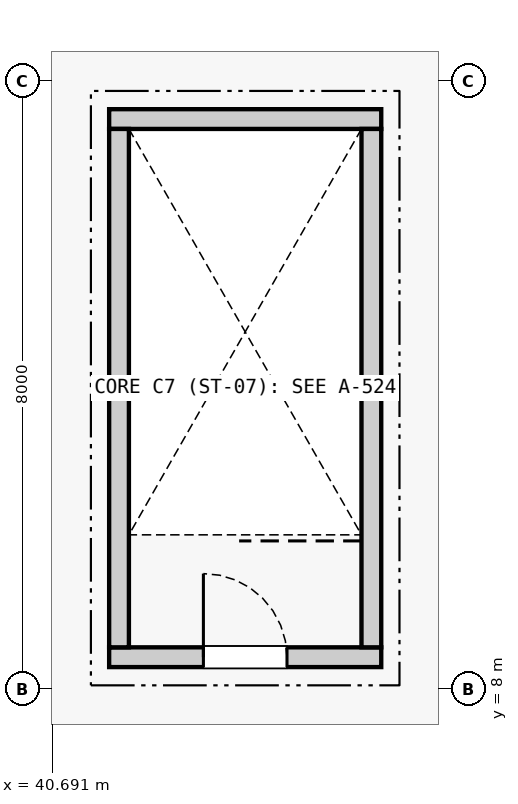
"""IFC4 building model, lengths in metres.
Left out: names, types, materials, properties, quantities, classifications, styles, units other than length and angle.
Written with IfcOpenShell. Run it as: python <this file> out.ifc"""

import sys

from ifc_helpers import new_model, si_unit, direction, frame, frame_2d, origin, place, context, subcontext, project, spatial, rectangle, extrude, element, fill, save


model = new_model("IFC4")
c1 = context("Model", 3, precision=1e-05, world=origin(), true_north=direction((0.0, 1.0)))
c2 = subcontext(c1, "Body", "Model", "MODEL_VIEW")
j1 = project(units=[si_unit("LENGTHUNIT", "METRE"), si_unit("PLANEANGLEUNIT", "RADIAN")], contexts=[c1])
p1 = place(None, origin())
s1 = spatial("IfcSite", under=j1, at=p1, CompositionType="ELEMENT")
p2 = place(p1, origin())
s2 = spatial("IfcBuilding", under=s1, at=p2, CompositionType="ELEMENT")
p3 = place(p2, frame((0.0, 0.0, 10.5)))
s3 = spatial("IfcBuildingStorey", under=s2, at=p3, CompositionType="ELEMENT", Elevation=10.5)
p4 = place(p3, frame((41.44, 8.42, 0.0), z_axis=(0.0, 0.0, 1.0), x_axis=(1.0, 0.0, 0.0)))
e1 = element("IfcWall", 1, at=p4, inside=s3, PredefinedType="SOLIDWALL", context=c2, shape_type="SweptSolid", body=[
    extrude(rectangle(XDim=3.58, YDim=0.26, at=frame_2d((1.79, 0.0))), origin(), (0.0, 0.0, 1.0), 4.8),
])
p5 = place(p4, frame((1.24, 0.0, 0.0)))
e2 = element("IfcOpeningElement", 2, at=p5, cuts=e1, PredefinedType="OPENING", context=c2, shape_type="SweptSolid", body=[
    extrude(rectangle(XDim=1.1, YDim=2.2, at=frame_2d((0.55, 1.1))), frame((0.0, 0.142, 0.0), z_axis=(0.0, -1.0, 0.0), x_axis=(1.0, 0.0, 0.0)), (0.0, 0.0, 1.0), 0.284),
])
p6 = place(p3, frame((41.44, 15.5, 0.0), z_axis=(0.0, 0.0, 1.0), x_axis=(1.0, 0.0, 0.0)))
e3 = element("IfcWall", 3, at=p6, inside=s3, PredefinedType="SOLIDWALL", context=c2, shape_type="SweptSolid", body=[
    extrude(rectangle(XDim=3.58, YDim=0.26, at=frame_2d((1.79, 0.0))), origin(), (0.0, 0.0, 1.0), 4.8),
])
for number, where, z_axis, x_axis in (
    (4, (41.57, 8.55, 0.0), (0.0, 0.0, 1.0), (0.0, 1.0, 0.0)),
    (5, (44.89, 8.55, 0.0), (0.0, 0.0, 1.0), (0.0, 1.0, 0.0)),
):
    element("IfcWall", number, at=place(p3, frame(where, z_axis=z_axis, x_axis=x_axis)), inside=s3, PredefinedType="SOLIDWALL", context=c2, shape_type="SweptSolid", body=[
        extrude(rectangle(XDim=6.82, YDim=0.26, at=frame_2d((3.41, 0.0))), origin(), (0.0, 0.0, 1.0), 4.8),
    ])
p7 = place(p5, origin())
e6 = element("IfcDoor", 6, at=p7, inside=s3, OperationType="SINGLE_SWING_LEFT", PredefinedType="DOOR", context=c2, shape_type="SweptSolid", body=[
    extrude(rectangle(XDim=1.1, YDim=2.2, at=frame_2d((0.55, 1.1))), frame((0.0, 0.025, 0.0), z_axis=(0.0, -1.0, 0.0), x_axis=(1.0, 0.0, 0.0)), (0.0, 0.0, 1.0), 0.05),
])
fill(e2, e6)
save(model, sys.argv[1])
